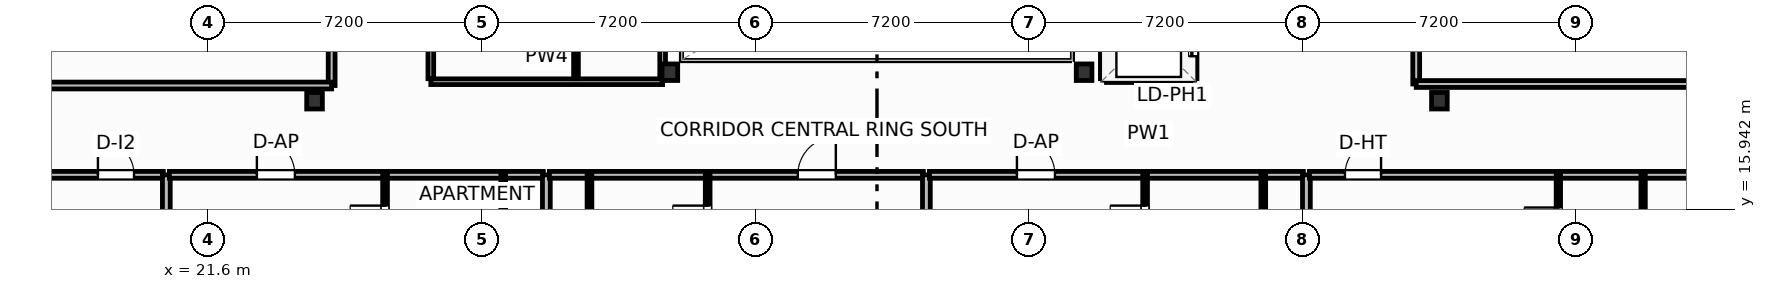
"""IFC4 building model, lengths in metres.
Left out: names, types, materials, properties, quantities, classifications, styles, units other than length and angle.
Written with IfcOpenShell. Run it as: python <this file> out.ifc"""

import sys

from ifc_helpers import new_model, si_unit, direction, frame, frame_2d, origin, origin_2d, place, context, subcontext, project, spatial, rectangle, i_section, extrude, element, fill, save


model = new_model("IFC4")
c1 = context("Model", 3, precision=1e-05, world=origin(), true_north=direction((0.0, 1.0)))
c2 = subcontext(c1, "Body", "Model", "MODEL_VIEW")
j1 = project(units=[si_unit("LENGTHUNIT", "METRE"), si_unit("PLANEANGLEUNIT", "RADIAN")], contexts=[c1])
p1 = place(None, origin())
s1 = spatial("IfcSite", under=j1, at=p1, CompositionType="ELEMENT")
p2 = place(p1, origin())
s2 = spatial("IfcBuilding", under=s1, at=p2, CompositionType="ELEMENT")
p3 = place(p2, frame((0.0, 0.0, 216.4)))
s3 = spatial("IfcBuildingStorey", under=s2, at=p3, CompositionType="ELEMENT", Elevation=216.4)
for number, where, z_axis, x_axis in (
    (1, (33.75, 19.55, 0.0), (0.0, 0.0, 1.0), (1.0, 0.0, 0.0)),
    (2, (44.65, 19.55, 0.0), (0.0, 0.0, 1.0), (1.0, 0.0, 0.0)),
    (3, (24.4, 18.8, 0.0), (0.0, 0.0, 1.0), (1.0, 0.0, 0.0)),
    (4, (54.0, 18.8, 0.0), (0.0, 0.0, 1.0), (1.0, 0.0, 0.0)),
):
    element("IfcColumn", number, at=place(p3, frame(where, z_axis=z_axis, x_axis=x_axis)), inside=s3, PredefinedType="COLUMN", context=c2, shape_type="SweptSolid", body=[
        extrude(i_section(OverallWidth=0.412, OverallDepth=0.435, WebThickness=0.036, FlangeThickness=0.057, FilletRadius=0.025, at=origin_2d()), origin(), (0.0, 0.0, 1.0), 3.7),
    ])
p4 = place(p3, frame((56.219, 9.845, 0.0), z_axis=(0.0, 0.0, 1.0), x_axis=(0.935225601791, 0.354052360188, 0.0)))
e5 = element("IfcWall", 5, at=p4, inside=s3, PredefinedType="SOLIDWALL", context=c2, shape_type="SweptSolid", body=[
    extrude(rectangle(XDim=17.647, YDim=0.22, at=frame_2d((8.824, 0.0))), origin(), (0.0, 0.0, 1.0), 2.73),
])
p5 = place(p4, frame((7.774, 0.0, 0.8)))
e6 = element("IfcOpeningElement", 6, at=p5, cuts=e5, PredefinedType="OPENING", context=c2, shape_type="SweptSolid", body=[
    extrude(rectangle(XDim=2.1, YDim=1.75, at=frame_2d((1.05, 0.875))), frame((0.0, 0.12, 0.0), z_axis=(0.0, -1.0, 0.0), x_axis=(1.0, 0.0, 0.0)), (0.0, 0.0, 1.0), 0.24),
])
p6 = place(p3, frame((7.196, 16.85, 0.0), z_axis=(0.0, 0.0, 1.0), x_axis=(1.0, 0.0, 0.0)))
e7 = element("IfcWall", 7, at=p6, inside=s3, PredefinedType="PARTITIONING", context=c2, shape_type="SweptSolid", body=[
    extrude(rectangle(XDim=13.224, YDim=0.18, at=frame_2d((6.612, 0.0))), origin(), (0.0, 0.0, 1.0), 3.45),
])
p7 = place(p6, frame((11.504, 0.0, 0.0)))
e8 = element("IfcOpeningElement", 8, at=p7, cuts=e7, PredefinedType="OPENING", context=c2, shape_type="SweptSolid", body=[
    extrude(rectangle(XDim=0.95, YDim=2.05, at=frame_2d((0.475, 1.025))), frame((0.0, 0.1, 0.0), z_axis=(0.0, -1.0, 0.0), x_axis=(1.0, 0.0, 0.0)), (0.0, 0.0, 1.0), 0.2),
])
p8 = place(p3, frame((20.5, -3.657, 0.0), z_axis=(0.0, 0.0, 1.0), x_axis=(0.0, 1.0, 0.0)))
e9 = element("IfcWall", 9, at=p8, inside=s3, PredefinedType="PARTITIONING", context=c2, shape_type="SweptSolid", body=[
    extrude(rectangle(XDim=20.507, YDim=0.205, at=frame_2d((10.253, 0.0))), origin(), (0.0, 0.0, 1.0), 3.45),
])
p9 = place(p3, frame((20.58, 16.85, 0.0), z_axis=(0.0, 0.0, 1.0), x_axis=(1.0, 0.0, 0.0)))
e10 = element("IfcWall", 10, at=p9, inside=s3, PredefinedType="PARTITIONING", context=c2, shape_type="SweptSolid", body=[
    extrude(rectangle(XDim=9.84, YDim=0.18, at=frame_2d((4.92, 0.0))), origin(), (0.0, 0.0, 1.0), 3.45),
])
p10 = place(p9, frame((2.302, 0.0, 0.0)))
e11 = element("IfcOpeningElement", 11, at=p10, cuts=e10, PredefinedType="OPENING", context=c2, shape_type="SweptSolid", body=[
    extrude(rectangle(XDim=1.0, YDim=2.2, at=frame_2d((0.5, 1.1))), frame((0.0, 0.1, 0.0), z_axis=(0.0, -1.0, 0.0), x_axis=(1.0, 0.0, 0.0)), (0.0, 0.0, 1.0), 0.2),
])
p11 = place(p3, frame((26.255, -1.478, 0.0), z_axis=(0.0, 0.0, 1.0), x_axis=(0.0, 1.0, 0.0)))
e12 = element("IfcWall", 12, at=p11, inside=s3, PredefinedType="PARTITIONING", context=c2, shape_type="SweptSolid", body=[
    extrude(rectangle(XDim=18.328, YDim=0.125, at=frame_2d((9.164, 0.0))), origin(), (0.0, 0.0, 1.0), 2.739),
])
p12 = place(p11, frame((6.319, 0.0, 0.0)))
e13 = element("IfcOpeningElement", 13, at=p12, cuts=e12, PredefinedType="OPENING", context=c2, shape_type="SweptSolid", body=[
    extrude(rectangle(XDim=0.92, YDim=2.05, at=frame_2d((0.46, 1.025))), frame((0.0, 0.073, 0.0), z_axis=(0.0, -1.0, 0.0), x_axis=(1.0, 0.0, 0.0)), (0.0, 0.0, 1.0), 0.145),
])
p13 = place(p11, frame((14.305, 0.0, 0.0)))
e14 = element("IfcOpeningElement", 14, at=p13, cuts=e12, PredefinedType="OPENING", context=c2, shape_type="SweptSolid", body=[
    extrude(rectangle(XDim=0.9, YDim=2.05, at=frame_2d((0.45, 1.025))), frame((0.0, 0.073, 0.0), z_axis=(0.0, -1.0, 0.0), x_axis=(1.0, 0.0, 0.0)), (0.0, 0.0, 1.0), 0.145),
])
p14 = place(p11, frame((16.598, 0.0, 0.0)))
e15 = element("IfcOpeningElement", 15, at=p14, cuts=e12, PredefinedType="OPENING", context=c2, shape_type="SweptSolid", body=[
    extrude(rectangle(XDim=0.92, YDim=2.05, at=frame_2d((0.46, 1.025))), frame((0.0, 0.073, 0.0), z_axis=(0.0, -1.0, 0.0), x_axis=(1.0, 0.0, 0.0)), (0.0, 0.0, 1.0), 0.145),
])
p15 = place(p3, frame((29.365, 14.44, 0.0), z_axis=(0.0, 0.0, 1.0), x_axis=(0.0, 1.0, 0.0)))
e16 = element("IfcWall", 16, at=p15, inside=s3, PredefinedType="PARTITIONING", context=c2, shape_type="SweptSolid", body=[
    extrude(rectangle(XDim=2.41, YDim=0.125, at=frame_2d((1.205, 0.0))), origin(), (0.0, 0.0, 1.0), 3.45),
])
p16 = place(p3, frame((30.5, 0.129, 0.0), z_axis=(0.0, 0.0, 1.0), x_axis=(0.0, 1.0, 0.0)))
e17 = element("IfcWall", 17, at=p16, inside=s3, PredefinedType="PARTITIONING", context=c2, shape_type="SweptSolid", body=[
    extrude(rectangle(XDim=16.721, YDim=0.205, at=frame_2d((8.36, 0.0))), origin(), (0.0, 0.0, 1.0), 3.45),
])
p17 = place(p3, frame((30.58, 16.85, 0.0), z_axis=(0.0, 0.0, 1.0), x_axis=(1.0, 0.0, 0.0)))
e18 = element("IfcWall", 18, at=p17, inside=s3, PredefinedType="PARTITIONING", context=c2, shape_type="SweptSolid", body=[
    extrude(rectangle(XDim=9.84, YDim=0.18, at=frame_2d((4.92, 0.0))), origin(), (0.0, 0.0, 1.0), 3.45),
])
p18 = place(p17, frame((6.537, 0.0, 0.0)))
e19 = element("IfcOpeningElement", 19, at=p18, cuts=e18, PredefinedType="OPENING", context=c2, shape_type="SweptSolid", body=[
    extrude(rectangle(XDim=1.0, YDim=2.2, at=frame_2d((0.5, 1.1))), frame((0.0, 0.1, 0.0), z_axis=(0.0, -1.0, 0.0), x_axis=(1.0, 0.0, 0.0)), (0.0, 0.0, 1.0), 0.2),
])
p19 = place(p3, frame((34.745, 1.736, 0.0), z_axis=(0.0, 0.0, 1.0), x_axis=(0.0, 1.0, 0.0)))
e20 = element("IfcWall", 20, at=p19, inside=s3, PredefinedType="PARTITIONING", context=c2, shape_type="SweptSolid", body=[
    extrude(rectangle(XDim=15.114, YDim=0.125, at=frame_2d((7.557, 0.0))), origin(), (0.0, 0.0, 1.0), 2.739),
])
p20 = place(p19, frame((4.712, 0.0, 0.0)))
e21 = element("IfcOpeningElement", 21, at=p20, cuts=e20, PredefinedType="OPENING", context=c2, shape_type="SweptSolid", body=[
    extrude(rectangle(XDim=0.92, YDim=2.05, at=frame_2d((0.46, 1.025))), frame((0.0, 0.073, 0.0), z_axis=(0.0, -1.0, 0.0), x_axis=(1.0, 0.0, 0.0)), (0.0, 0.0, 1.0), 0.145),
])
p21 = place(p19, frame((11.091, 0.0, 0.0)))
e22 = element("IfcOpeningElement", 22, at=p21, cuts=e20, PredefinedType="OPENING", context=c2, shape_type="SweptSolid", body=[
    extrude(rectangle(XDim=0.9, YDim=2.05, at=frame_2d((0.45, 1.025))), frame((0.0, 0.073, 0.0), z_axis=(0.0, -1.0, 0.0), x_axis=(1.0, 0.0, 0.0)), (0.0, 0.0, 1.0), 0.145),
])
p22 = place(p19, frame((13.384, 0.0, 0.0)))
e23 = element("IfcOpeningElement", 23, at=p22, cuts=e20, PredefinedType="OPENING", context=c2, shape_type="SweptSolid", body=[
    extrude(rectangle(XDim=0.92, YDim=2.05, at=frame_2d((0.46, 1.025))), frame((0.0, 0.073, 0.0), z_axis=(0.0, -1.0, 0.0), x_axis=(1.0, 0.0, 0.0)), (0.0, 0.0, 1.0), 0.145),
])
p23 = place(p3, frame((31.635, 14.44, 0.0), z_axis=(0.0, 0.0, 1.0), x_axis=(0.0, 1.0, 0.0)))
e24 = element("IfcWall", 24, at=p23, inside=s3, PredefinedType="PARTITIONING", context=c2, shape_type="SweptSolid", body=[
    extrude(rectangle(XDim=2.41, YDim=0.125, at=frame_2d((1.205, 0.0))), origin(), (0.0, 0.0, 1.0), 3.45),
])
p24 = place(p3, frame((40.5, 6.16, 0.0), z_axis=(0.0, 0.0, 1.0), x_axis=(0.0, 1.0, 0.0)))
e25 = element("IfcWall", 25, at=p24, inside=s3, PredefinedType="PARTITIONING", context=c2, shape_type="SweptSolid", body=[
    extrude(rectangle(XDim=10.69, YDim=0.205, at=frame_2d((5.345, 0.0))), origin(), (0.0, 0.0, 1.0), 3.45),
])
p25 = place(p3, frame((40.58, 16.85, 0.0), z_axis=(0.0, 0.0, 1.0), x_axis=(1.0, 0.0, 0.0)))
e26 = element("IfcWall", 26, at=p25, inside=s3, PredefinedType="PARTITIONING", context=c2, shape_type="SweptSolid", body=[
    extrude(rectangle(XDim=9.84, YDim=0.18, at=frame_2d((4.92, 0.0))), origin(), (0.0, 0.0, 1.0), 3.45),
])
p26 = place(p25, frame((2.302, 0.0, 0.0)))
e27 = element("IfcOpeningElement", 27, at=p26, cuts=e26, PredefinedType="OPENING", context=c2, shape_type="SweptSolid", body=[
    extrude(rectangle(XDim=1.0, YDim=2.2, at=frame_2d((0.5, 1.1))), frame((0.0, 0.1, 0.0), z_axis=(0.0, -1.0, 0.0), x_axis=(1.0, 0.0, 0.0)), (0.0, 0.0, 1.0), 0.2),
])
p27 = place(p3, frame((46.255, 6.094, 0.0), z_axis=(0.0, 0.0, 1.0), x_axis=(0.0, 1.0, 0.0)))
e28 = element("IfcWall", 28, at=p27, inside=s3, PredefinedType="PARTITIONING", context=c2, shape_type="SweptSolid", body=[
    extrude(rectangle(XDim=10.756, YDim=0.125, at=frame_2d((5.378, 0.0))), origin(), (0.0, 0.0, 1.0), 3.45),
])
p28 = place(p27, frame((3.003, 0.0, 0.0)))
e29 = element("IfcOpeningElement", 29, at=p28, cuts=e28, PredefinedType="OPENING", context=c2, shape_type="SweptSolid", body=[
    extrude(rectangle(XDim=0.92, YDim=2.05, at=frame_2d((0.46, 1.025))), frame((0.0, 0.073, 0.0), z_axis=(0.0, -1.0, 0.0), x_axis=(1.0, 0.0, 0.0)), (0.0, 0.0, 1.0), 0.145),
])
p29 = place(p27, frame((6.733, 0.0, 0.0)))
e30 = element("IfcOpeningElement", 30, at=p29, cuts=e28, PredefinedType="OPENING", context=c2, shape_type="SweptSolid", body=[
    extrude(rectangle(XDim=0.9, YDim=2.05, at=frame_2d((0.45, 1.025))), frame((0.0, 0.073, 0.0), z_axis=(0.0, -1.0, 0.0), x_axis=(1.0, 0.0, 0.0)), (0.0, 0.0, 1.0), 0.145),
])
p30 = place(p27, frame((9.026, 0.0, 0.0)))
e31 = element("IfcOpeningElement", 31, at=p30, cuts=e28, PredefinedType="OPENING", context=c2, shape_type="SweptSolid", body=[
    extrude(rectangle(XDim=0.92, YDim=2.05, at=frame_2d((0.46, 1.025))), frame((0.0, 0.073, 0.0), z_axis=(0.0, -1.0, 0.0), x_axis=(1.0, 0.0, 0.0)), (0.0, 0.0, 1.0), 0.145),
])
p31 = place(p3, frame((49.365, 14.44, 0.0), z_axis=(0.0, 0.0, 1.0), x_axis=(0.0, 1.0, 0.0)))
e32 = element("IfcWall", 32, at=p31, inside=s3, PredefinedType="PARTITIONING", context=c2, shape_type="SweptSolid", body=[
    extrude(rectangle(XDim=2.41, YDim=0.125, at=frame_2d((1.205, 0.0))), origin(), (0.0, 0.0, 1.0), 3.45),
])
p32 = place(p3, frame((50.5, 9.946, 0.0), z_axis=(0.0, 0.0, 1.0), x_axis=(0.0, 1.0, 0.0)))
e33 = element("IfcWall", 33, at=p32, inside=s3, PredefinedType="PARTITIONING", context=c2, shape_type="SweptSolid", body=[
    extrude(rectangle(XDim=6.904, YDim=0.205, at=frame_2d((3.452, 0.0))), origin(), (0.0, 0.0, 1.0), 3.45),
])
p33 = place(p3, frame((50.58, 16.85, 0.0), z_axis=(0.0, 0.0, 1.0), x_axis=(1.0, 0.0, 0.0)))
e34 = element("IfcWall", 34, at=p33, inside=s3, PredefinedType="PARTITIONING", context=c2, shape_type="SweptSolid", body=[
    extrude(rectangle(XDim=23.404, YDim=0.18, at=frame_2d((11.702, 0.0))), origin(), (0.0, 0.0, 1.0), 3.45),
])
p34 = place(p33, frame((0.935, 0.0, 0.0)))
e35 = element("IfcOpeningElement", 35, at=p34, cuts=e34, PredefinedType="OPENING", context=c2, shape_type="SweptSolid", body=[
    extrude(rectangle(XDim=0.95, YDim=2.15, at=frame_2d((0.475, 1.075))), frame((0.0, 0.1, 0.0), z_axis=(0.0, -1.0, 0.0), x_axis=(1.0, 0.0, 0.0)), (0.0, 0.0, 1.0), 0.2),
])
p35 = place(p3, frame((57.13, 14.33, 0.0), z_axis=(0.0, 0.0, 1.0), x_axis=(0.0, 1.0, 0.0)))
e36 = element("IfcWall", 36, at=p35, inside=s3, PredefinedType="PARTITIONING", context=c2, shape_type="SweptSolid", body=[
    extrude(rectangle(XDim=2.52, YDim=0.115, at=frame_2d((1.26, 0.0))), origin(), (0.0, 0.0, 1.0), 3.45),
])
p36 = place(p35, frame((0.76, 0.0, 0.0)))
e37 = element("IfcOpeningElement", 37, at=p36, cuts=e36, PredefinedType="OPENING", context=c2, shape_type="SweptSolid", body=[
    extrude(rectangle(XDim=0.9, YDim=2.05, at=frame_2d((0.45, 1.025))), frame((0.0, 0.067, 0.0), z_axis=(0.0, -1.0, 0.0), x_axis=(1.0, 0.0, 0.0)), (0.0, 0.0, 1.0), 0.135),
])
p37 = place(p3, frame((59.36, 14.33, 0.0), z_axis=(0.0, 0.0, 1.0), x_axis=(0.0, 1.0, 0.0)))
e38 = element("IfcWall", 38, at=p37, inside=s3, PredefinedType="PARTITIONING", context=c2, shape_type="SweptSolid", body=[
    extrude(rectangle(XDim=2.52, YDim=0.115, at=frame_2d((1.26, 0.0))), origin(), (0.0, 0.0, 1.0), 3.45),
])
p38 = place(p3, frame((24.85, 19.2, 0.0), z_axis=(0.0, 0.0, 1.0), x_axis=(0.0, 1.0, 0.0)))
e39 = element("IfcWall", 39, at=p38, inside=s3, PredefinedType="PARTITIONING", context=c2, shape_type="SweptSolid", body=[
    extrude(rectangle(XDim=7.5, YDim=0.18, at=frame_2d((3.75, 0.0))), origin(), (0.0, 0.0, 1.0), 3.45),
])
p39 = place(p38, frame((3.275, 0.0, 0.0)))
e40 = element("IfcOpeningElement", 40, at=p39, cuts=e39, PredefinedType="OPENING", context=c2, shape_type="SweptSolid", body=[
    extrude(rectangle(XDim=0.95, YDim=2.05, at=frame_2d((0.475, 1.025))), frame((0.0, 0.1, 0.0), z_axis=(0.0, -1.0, 0.0), x_axis=(1.0, 0.0, 0.0)), (0.0, 0.0, 1.0), 0.2),
])
p40 = place(p3, frame((6.306, 19.2, 0.0), z_axis=(0.0, 0.0, 1.0), x_axis=(1.0, 0.0, 0.0)))
e41 = element("IfcWall", 41, at=p40, inside=s3, PredefinedType="PARTITIONING", context=c2, shape_type="SweptSolid", body=[
    extrude(rectangle(XDim=18.544, YDim=0.18, at=frame_2d((9.272, 0.0))), origin(), (0.0, 0.0, 1.0), 3.45),
])
p41 = place(p3, frame((53.39, 19.24, 0.0), z_axis=(0.0, 0.0, 1.0), x_axis=(0.0, 1.0, 0.0)))
e42 = element("IfcWall", 42, at=p41, inside=s3, PredefinedType="PARTITIONING", context=c2, shape_type="SweptSolid", body=[
    extrude(rectangle(XDim=20.06, YDim=0.18, at=frame_2d((10.03, 0.0))), origin(), (0.0, 0.0, 1.0), 3.45),
])
p42 = place(p41, frame((7.7, 0.0, 0.0)))
e43 = element("IfcOpeningElement", 43, at=p42, cuts=e42, PredefinedType="OPENING", context=c2, shape_type="SweptSolid", body=[
    extrude(rectangle(XDim=0.95, YDim=2.05, at=frame_2d((0.475, 1.025))), frame((0.0, 0.1, 0.0), z_axis=(0.0, -1.0, 0.0), x_axis=(1.0, 0.0, 0.0)), (0.0, 0.0, 1.0), 0.2),
])
p43 = place(p3, frame((53.39, 19.24, 0.0), z_axis=(0.0, 0.0, 1.0), x_axis=(1.0, 0.0, 0.0)))
e44 = element("IfcWall", 44, at=p43, inside=s3, PredefinedType="PARTITIONING", context=c2, shape_type="SweptSolid", body=[
    extrude(rectangle(XDim=22.217, YDim=0.18, at=frame_2d((11.108, 0.0))), origin(), (0.0, 0.0, 1.0), 3.45),
])
p44 = place(p3, frame((27.46, 19.3, 0.0), z_axis=(0.0, 0.0, 1.0), x_axis=(1.0, 0.0, 0.0)))
e45 = element("IfcWall", 45, at=p44, inside=s3, PredefinedType="PARTITIONING", context=c2, shape_type="SweptSolid", body=[
    extrude(rectangle(XDim=6.1, YDim=0.15, at=frame_2d((3.05, 0.0))), origin(), (0.0, 0.0, 1.0), 2.662),
])
p45 = place(p3, frame((31.28, 19.38, 0.0), z_axis=(0.0, 0.0, 1.0), x_axis=(0.0, 1.0, 0.0)))
e46 = element("IfcWall", 46, at=p45, inside=s3, PredefinedType="PARTITIONING", context=c2, shape_type="SweptSolid", body=[
    extrude(rectangle(XDim=7.16, YDim=0.125, at=frame_2d((3.58, 0.0))), origin(), (0.0, 0.0, 1.0), 3.45),
])
p46 = place(p3, frame((27.46, 19.38, 0.0), z_axis=(0.0, 0.0, 1.0), x_axis=(0.0, 1.0, 0.0)))
e47 = element("IfcWall", 47, at=p46, inside=s3, PredefinedType="PARTITIONING", context=c2, shape_type="SweptSolid", body=[
    extrude(rectangle(XDim=7.16, YDim=0.15, at=frame_2d((3.58, 0.0))), origin(), (0.0, 0.0, 1.0), 3.45),
])
p47 = place(p46, frame((1.4, 0.0, 0.0)))
e48 = element("IfcOpeningElement", 48, at=p47, cuts=e47, PredefinedType="OPENING", context=c2, shape_type="SweptSolid", body=[
    extrude(rectangle(XDim=0.95, YDim=2.05, at=frame_2d((0.475, 1.025))), frame((0.0, 0.085, 0.0), z_axis=(0.0, -1.0, 0.0), x_axis=(1.0, 0.0, 0.0)), (0.0, 0.0, 1.0), 0.17),
])
p48 = place(p3, frame((33.56, 19.38, 0.0), z_axis=(0.0, 0.0, 1.0), x_axis=(0.0, 1.0, 0.0)))
e49 = element("IfcWall", 49, at=p48, inside=s3, PredefinedType="PARTITIONING", context=c2, shape_type="SweptSolid", body=[
    extrude(rectangle(XDim=7.16, YDim=0.15, at=frame_2d((3.58, 0.0))), origin(), (0.0, 0.0, 1.0), 2.824),
])
p49 = place(p3, frame((45.24, 19.38, 0.0), z_axis=(0.0, 0.0, 1.0), x_axis=(1.0, 0.0, 0.0)))
e50 = element("IfcWall", 50, at=p49, inside=s3, PredefinedType="PARTITIONING", context=c2, shape_type="SweptSolid", body=[
    extrude(rectangle(XDim=2.22, YDim=0.2, at=frame_2d((1.11, 0.0))), origin(), (0.0, 0.0, 1.0), 2.662),
])
p50 = place(p3, frame((45.18, 19.38, 0.0), z_axis=(0.0, 0.0, 1.0), x_axis=(0.0, 1.0, 0.0)))
e51 = element("IfcWall", 51, at=p50, inside=s3, PredefinedType="PARTITIONING", context=c2, shape_type="SweptSolid", body=[
    extrude(rectangle(XDim=6.9, YDim=0.2, at=frame_2d((3.45, 0.0))), origin(), (0.0, 0.0, 1.0), 3.45),
])
p51 = place(p3, frame((47.52, 19.38, 0.0), z_axis=(0.0, 0.0, 1.0), x_axis=(0.0, 1.0, 0.0)))
e52 = element("IfcWall", 52, at=p51, inside=s3, PredefinedType="PARTITIONING", context=c2, shape_type="SweptSolid", body=[
    extrude(rectangle(XDim=6.9, YDim=0.2, at=frame_2d((3.45, 0.0))), origin(), (0.0, 0.0, 1.0), 3.45),
])
p52 = place(p51, frame((0.59, 0.0, 0.0)))
e53 = element("IfcOpeningElement", 53, at=p52, cuts=e52, PredefinedType="OPENING", context=c2, shape_type="SweptSolid", body=[
    extrude(rectangle(XDim=1.1, YDim=2.15, at=frame_2d((0.55, 1.075))), frame((0.0, 0.11, 0.0), z_axis=(0.0, -1.0, 0.0), x_axis=(1.0, 0.0, 0.0)), (0.0, 0.0, 1.0), 0.22),
])
p53 = place(p51, frame((2.89, 0.0, 0.0)))
e54 = element("IfcOpeningElement", 54, at=p53, cuts=e52, PredefinedType="OPENING", context=c2, shape_type="SweptSolid", body=[
    extrude(rectangle(XDim=1.1, YDim=2.15, at=frame_2d((0.55, 1.075))), frame((0.0, 0.11, 0.0), z_axis=(0.0, -1.0, 0.0), x_axis=(1.0, 0.0, 0.0)), (0.0, 0.0, 1.0), 0.22),
])
p54 = place(p51, frame((5.19, 0.0, 0.0)))
e55 = element("IfcOpeningElement", 55, at=p54, cuts=e52, PredefinedType="OPENING", context=c2, shape_type="SweptSolid", body=[
    extrude(rectangle(XDim=1.1, YDim=2.15, at=frame_2d((0.55, 1.075))), frame((0.0, 0.11, 0.0), z_axis=(0.0, -1.0, 0.0), x_axis=(1.0, 0.0, 0.0)), (0.0, 0.0, 1.0), 0.22),
])
p55 = place(p7, origin())
e56 = element("IfcDoor", 56, at=p55, inside=s3, OperationType="SINGLE_SWING_LEFT", PredefinedType="DOOR", context=c2, shape_type="SweptSolid", body=[
    extrude(rectangle(XDim=0.95, YDim=2.05, at=frame_2d((0.475, 1.025))), frame((0.0, 0.025, 0.0), z_axis=(0.0, -1.0, 0.0), x_axis=(1.0, 0.0, 0.0)), (0.0, 0.0, 1.0), 0.05),
])
fill(e8, e56)
p56 = place(p10, origin())
e57 = element("IfcDoor", 57, at=p56, inside=s3, OperationType="SINGLE_SWING_LEFT", PredefinedType="DOOR", context=c2, shape_type="SweptSolid", body=[
    extrude(rectangle(XDim=1.0, YDim=2.2, at=frame_2d((0.5, 1.1))), frame((0.0, 0.025, 0.0), z_axis=(0.0, -1.0, 0.0), x_axis=(1.0, 0.0, 0.0)), (0.0, 0.0, 1.0), 0.05),
])
fill(e11, e57)
p57 = place(p14, origin())
e58 = element("IfcDoor", 58, at=p57, inside=s3, OperationType="SINGLE_SWING_RIGHT", PredefinedType="DOOR", context=c2, shape_type="SweptSolid", body=[
    extrude(rectangle(XDim=0.92, YDim=2.05, at=frame_2d((0.46, 1.025))), frame((0.0, 0.025, 0.0), z_axis=(0.0, -1.0, 0.0), x_axis=(1.0, 0.0, 0.0)), (0.0, 0.0, 1.0), 0.05),
])
fill(e15, e58)
p58 = place(p18, origin())
e59 = element("IfcDoor", 59, at=p58, inside=s3, OperationType="SINGLE_SWING_RIGHT", PredefinedType="DOOR", context=c2, shape_type="SweptSolid", body=[
    extrude(rectangle(XDim=1.0, YDim=2.2, at=frame_2d((0.5, 1.1))), frame((0.0, 0.025, 0.0), z_axis=(0.0, -1.0, 0.0), x_axis=(1.0, 0.0, 0.0)), (0.0, 0.0, 1.0), 0.05),
])
fill(e19, e59)
p59 = place(p22, origin())
e60 = element("IfcDoor", 60, at=p59, inside=s3, OperationType="SINGLE_SWING_RIGHT", PredefinedType="DOOR", context=c2, shape_type="SweptSolid", body=[
    extrude(rectangle(XDim=0.92, YDim=2.05, at=frame_2d((0.46, 1.025))), frame((0.0, 0.025, 0.0), z_axis=(0.0, -1.0, 0.0), x_axis=(1.0, 0.0, 0.0)), (0.0, 0.0, 1.0), 0.05),
])
fill(e23, e60)
p60 = place(p26, origin())
e61 = element("IfcDoor", 61, at=p60, inside=s3, OperationType="SINGLE_SWING_LEFT", PredefinedType="DOOR", context=c2, shape_type="SweptSolid", body=[
    extrude(rectangle(XDim=1.0, YDim=2.2, at=frame_2d((0.5, 1.1))), frame((0.0, 0.025, 0.0), z_axis=(0.0, -1.0, 0.0), x_axis=(1.0, 0.0, 0.0)), (0.0, 0.0, 1.0), 0.05),
])
fill(e27, e61)
p61 = place(p30, origin())
e62 = element("IfcDoor", 62, at=p61, inside=s3, OperationType="SINGLE_SWING_RIGHT", PredefinedType="DOOR", context=c2, shape_type="SweptSolid", body=[
    extrude(rectangle(XDim=0.92, YDim=2.05, at=frame_2d((0.46, 1.025))), frame((0.0, 0.025, 0.0), z_axis=(0.0, -1.0, 0.0), x_axis=(1.0, 0.0, 0.0)), (0.0, 0.0, 1.0), 0.05),
])
fill(e31, e62)
p62 = place(p34, origin())
e63 = element("IfcDoor", 63, at=p62, inside=s3, OperationType="SINGLE_SWING_RIGHT", PredefinedType="DOOR", context=c2, shape_type="SweptSolid", body=[
    extrude(rectangle(XDim=0.95, YDim=2.15, at=frame_2d((0.475, 1.075))), frame((0.0, 0.025, 0.0), z_axis=(0.0, -1.0, 0.0), x_axis=(1.0, 0.0, 0.0)), (0.0, 0.0, 1.0), 0.05),
])
fill(e35, e63)
p63 = place(p36, origin())
e64 = element("IfcDoor", 64, at=p63, inside=s3, OperationType="SINGLE_SWING_RIGHT", PredefinedType="DOOR", context=c2, shape_type="SweptSolid", body=[
    extrude(rectangle(XDim=0.9, YDim=2.05, at=frame_2d((0.45, 1.025))), frame((0.0, 0.025, 0.0), z_axis=(0.0, -1.0, 0.0), x_axis=(1.0, 0.0, 0.0)), (0.0, 0.0, 1.0), 0.05),
])
fill(e37, e64)
p64 = place(p52, origin())
e65 = element("IfcDoor", 65, at=p64, inside=s3, OperationType="SLIDING_TO_LEFT", PredefinedType="DOOR", context=c2, shape_type="SweptSolid", body=[
    extrude(rectangle(XDim=1.1, YDim=2.15, at=frame_2d((0.55, 1.075))), frame((0.0, 0.025, 0.0), z_axis=(0.0, -1.0, 0.0), x_axis=(1.0, 0.0, 0.0)), (0.0, 0.0, 1.0), 0.05),
])
fill(e53, e65)
save(model, sys.argv[1])
